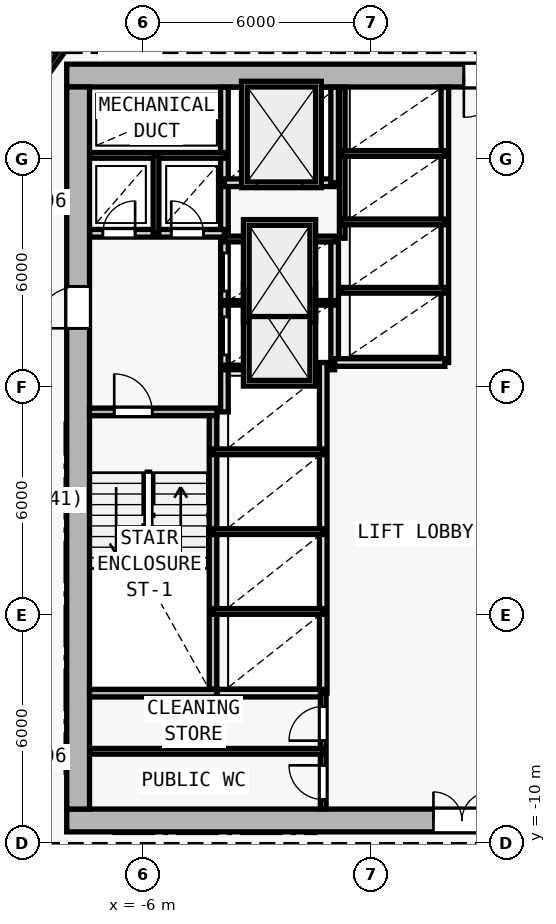
"""IFC4 building model, lengths in metres.
Left out: names, types, materials, properties, quantities, classifications, styles, units other than length and angle.
Written with IfcOpenShell. Run it as: python <this file> out.ifc"""

import sys

from ifc_helpers import new_model, si_unit, direction, frame, frame_2d, origin, origin_2d, place, context, subcontext, project, spatial, rectangle, i_section, extrude, element, fill, save


model = new_model("IFC4")
c1 = context("Model", 3, precision=1e-05, world=origin(), true_north=direction((0.0, 1.0)))
c2 = subcontext(c1, "Body", "Model", "MODEL_VIEW")
j1 = project(units=[si_unit("LENGTHUNIT", "METRE"), si_unit("PLANEANGLEUNIT", "RADIAN")], contexts=[c1])
p1 = place(None, origin())
s1 = spatial("IfcSite", under=j1, at=p1, CompositionType="ELEMENT")
p2 = place(p1, origin())
s2 = spatial("IfcBuilding", under=s1, at=p2, CompositionType="ELEMENT")
p3 = place(p2, frame((0.0, 0.0, 44.4)))
s3 = spatial("IfcBuildingStorey", under=s2, at=p3, CompositionType="ELEMENT", Elevation=44.4)
for number, where, z_axis, x_axis in (
    (1, (-7.7, -9.4, 0.0), (0.0, 0.0, 1.0), (1.0, 0.0, 0.0)),
    (2, (-7.7, 10.2, 0.0), (0.0, 0.0, 1.0), (1.0, 0.0, 0.0)),
    (3, (0.0, -9.4, 0.0), (0.0, 0.0, 1.0), (1.0, 0.0, 0.0)),
    (4, (-7.7, 2.0, 0.0), (0.0, 0.0, 1.0), (1.0, 0.0, 0.0)),
):
    element("IfcColumn", number, at=place(p3, frame(where, z_axis=z_axis, x_axis=x_axis)), inside=s3, PredefinedType="COLUMN", context=c2, shape_type="SweptSolid", body=[
        extrude(i_section(OverallWidth=0.416, OverallDepth=0.446, WebThickness=0.025, FlangeThickness=0.04, FilletRadius=0.015, at=origin_2d()), origin(), (0.0, 0.0, 1.0), 3.6),
    ])
p4 = place(p3, frame((-8.0, -9.4, 0.0), z_axis=(0.0, 0.0, 1.0), x_axis=(1.0, 0.0, 0.0)))
e5 = element("IfcWall", 5, at=p4, inside=s3, PredefinedType="SHEAR", context=c2, shape_type="SweptSolid", body=[
    extrude(rectangle(XDim=16.0, YDim=0.6, at=frame_2d((8.0, 0.0))), origin(), (0.0, 0.0, 1.0), 3.35),
])
p5 = place(p4, frame((9.65, 0.0, 0.0)))
e6 = element("IfcOpeningElement", 6, at=p5, cuts=e5, PredefinedType="OPENING", context=c2, shape_type="SweptSolid", body=[
    extrude(rectangle(XDim=1.5, YDim=2.2, at=frame_2d((0.75, 1.1))), frame((0.0, 0.31, 0.0), z_axis=(0.0, -1.0, 0.0), x_axis=(1.0, 0.0, 0.0)), (0.0, 0.0, 1.0), 0.62),
])
p6 = place(p3, frame((8.0, 10.2, 0.0), z_axis=(0.0, 0.0, 1.0), x_axis=(-1.0, 0.0, 0.0)))
e7 = element("IfcWall", 7, at=p6, inside=s3, PredefinedType="SHEAR", context=c2, shape_type="SweptSolid", body=[
    extrude(rectangle(XDim=16.0, YDim=0.6, at=frame_2d((8.0, 0.0))), origin(), (0.0, 0.0, 1.0), 3.35),
])
p7 = place(p6, frame((4.45, 0.0, 0.0)))
e8 = element("IfcOpeningElement", 8, at=p7, cuts=e7, PredefinedType="OPENING", context=c2, shape_type="SweptSolid", body=[
    extrude(rectangle(XDim=1.1, YDim=2.15, at=frame_2d((0.55, 1.075))), frame((0.0, 0.31, 0.0), z_axis=(0.0, -1.0, 0.0), x_axis=(1.0, 0.0, 0.0)), (0.0, 0.0, 1.0), 0.62),
])
p8 = place(p3, frame((-7.7, -9.1, 0.0), z_axis=(0.0, 0.0, 1.0), x_axis=(0.0, 1.0, 0.0)))
e9 = element("IfcWall", 9, at=p8, inside=s3, PredefinedType="SHEAR", context=c2, shape_type="SweptSolid", body=[
    extrude(rectangle(XDim=19.0, YDim=0.6, at=frame_2d((9.5, 0.0))), origin(), (0.0, 0.0, 1.0), 3.35),
])
p9 = place(p8, frame((12.65, 0.0, 0.0)))
e10 = element("IfcOpeningElement", 10, at=p9, cuts=e9, PredefinedType="OPENING", context=c2, shape_type="SweptSolid", body=[
    extrude(rectangle(XDim=1.1, YDim=2.15, at=frame_2d((0.55, 1.075))), frame((0.0, 0.31, 0.0), z_axis=(0.0, -1.0, 0.0), x_axis=(1.0, 0.0, 0.0)), (0.0, 0.0, 1.0), 0.62),
])
p10 = place(p3, frame((-7.4, 1.35, 0.0), z_axis=(0.0, 0.0, 1.0), x_axis=(1.0, 0.0, 0.0)))
e11 = element("IfcWall", 11, at=p10, inside=s3, PredefinedType="SOLIDWALL", context=c2, shape_type="SweptSolid", body=[
    extrude(rectangle(XDim=3.35, YDim=0.2, at=frame_2d((1.675, 0.0))), origin(), (0.0, 0.0, 1.0), 3.35),
])
p11 = place(p10, frame((0.65, 0.0, 0.0)))
e12 = element("IfcOpeningElement", 12, at=p11, cuts=e11, PredefinedType="OPENING", context=c2, shape_type="SweptSolid", body=[
    extrude(rectangle(XDim=1.0, YDim=2.15, at=frame_2d((0.5, 1.075))), frame((0.0, 0.11, 0.0), z_axis=(0.0, -1.0, 0.0), x_axis=(1.0, 0.0, 0.0)), (0.0, 0.0, 1.0), 0.22),
])
p12 = place(p3, frame((-4.15, -5.95, 0.0), z_axis=(0.0, 0.0, 1.0), x_axis=(0.0, 1.0, 0.0)))
e13 = element("IfcWall", 13, at=p12, inside=s3, PredefinedType="SOLIDWALL", context=c2, shape_type="SweptSolid", body=[
    extrude(rectangle(XDim=7.2, YDim=0.2, at=frame_2d((3.6, 0.0))), origin(), (0.0, 0.0, 1.0), 3.35),
])
p13 = place(p3, frame((-3.85, 1.35, 0.0), z_axis=(0.0, 0.0, 1.0), x_axis=(0.0, 1.0, 0.0)))
e14 = element("IfcWall", 14, at=p13, inside=s3, PredefinedType="SOLIDWALL", context=c2, shape_type="SweptSolid", body=[
    extrude(rectangle(XDim=8.545, YDim=0.2, at=frame_2d((4.272, 0.0))), origin(), (0.0, 0.0, 1.0), 3.35),
])
p14 = place(p13, frame((1.5, 0.0, 0.0)))
e15 = element("IfcOpeningElement", 15, at=p14, cuts=e14, PredefinedType="OPENING", context=c2, shape_type="SweptSolid", body=[
    extrude(rectangle(XDim=1.0, YDim=2.15, at=frame_2d((0.5, 1.075))), frame((0.0, 0.11, 0.0), z_axis=(0.0, -1.0, 0.0), x_axis=(1.0, 0.0, 0.0)), (0.0, 0.0, 1.0), 0.22),
])
p15 = place(p13, frame((3.18, 0.0, 0.0)))
e16 = element("IfcOpeningElement", 16, at=p15, cuts=e14, PredefinedType="OPENING", context=c2, shape_type="SweptSolid", body=[
    extrude(rectangle(XDim=1.0, YDim=2.15, at=frame_2d((0.5, 1.075))), frame((0.0, 0.11, 0.0), z_axis=(0.0, -1.0, 0.0), x_axis=(1.0, 0.0, 0.0)), (0.0, 0.0, 1.0), 0.22),
])
p16 = place(p3, frame((-7.395, 6.05, 0.0), z_axis=(0.0, 0.0, 1.0), x_axis=(1.0, 0.0, 0.0)))
e17 = element("IfcWall", 17, at=p16, inside=s3, PredefinedType="SOLIDWALL", context=c2, shape_type="SweptSolid", body=[
    extrude(rectangle(XDim=3.545, YDim=0.2, at=frame_2d((1.772, 0.0))), origin(), (0.0, 0.0, 1.0), 3.35),
])
p17 = place(p16, frame((0.345, 0.0, 0.0)))
e18 = element("IfcOpeningElement", 18, at=p17, cuts=e17, PredefinedType="OPENING", context=c2, shape_type="SweptSolid", body=[
    extrude(rectangle(XDim=0.85, YDim=2.1, at=frame_2d((0.425, 1.05))), frame((0.0, 0.11, 0.0), z_axis=(0.0, -1.0, 0.0), x_axis=(1.0, 0.0, 0.0)), (0.0, 0.0, 1.0), 0.22),
])
p18 = place(p16, frame((2.145, 0.0, 0.0)))
e19 = element("IfcOpeningElement", 19, at=p18, cuts=e17, PredefinedType="OPENING", context=c2, shape_type="SweptSolid", body=[
    extrude(rectangle(XDim=0.85, YDim=2.1, at=frame_2d((0.425, 1.05))), frame((0.0, 0.11, 0.0), z_axis=(0.0, -1.0, 0.0), x_axis=(1.0, 0.0, 0.0)), (0.0, 0.0, 1.0), 0.22),
])
p19 = place(p3, frame((-7.395, 8.1, 0.0), z_axis=(0.0, 0.0, 1.0), x_axis=(1.0, 0.0, 0.0)))
e20 = element("IfcWall", 20, at=p19, inside=s3, PredefinedType="PARTITIONING", context=c2, shape_type="SweptSolid", body=[
    extrude(rectangle(XDim=3.545, YDim=0.15, at=frame_2d((1.772, 0.0))), origin(), (0.0, 0.0, 1.0), 3.35),
])
p20 = place(p3, frame((-5.65, 6.05, 0.0), z_axis=(0.0, 0.0, 1.0), x_axis=(0.0, 1.0, 0.0)))
e21 = element("IfcWall", 21, at=p20, inside=s3, PredefinedType="PARTITIONING", context=c2, shape_type="SweptSolid", body=[
    extrude(rectangle(XDim=2.05, YDim=0.15, at=frame_2d((1.025, 0.0))), origin(), (0.0, 0.0, 1.0), 3.35),
])
p21 = place(p3, frame((-0.95, 2.65, 0.0), z_axis=(0.0, 0.0, 1.0), x_axis=(0.0, 1.0, 0.0)))
e22 = element("IfcWall", 22, at=p21, inside=s3, PredefinedType="SOLIDWALL", context=c2, shape_type="SweptSolid", body=[
    extrude(rectangle(XDim=3.27, YDim=0.2, at=frame_2d((1.635, 0.0))), origin(), (0.0, 0.0, 1.0), 3.35),
])
for number, where, z_axis, x_axis in (
    (23, (-3.85, 2.52, 0.0), (0.0, 0.0, 1.0), (1.0, 0.0, 0.0)),
    (24, (-3.85, 4.22, 0.0), (0.0, 0.0, 1.0), (1.0, 0.0, 0.0)),
):
    element("IfcWall", number, at=place(p3, frame(where, z_axis=z_axis, x_axis=x_axis)), inside=s3, PredefinedType="PARTITIONING", context=c2, shape_type="SweptSolid", body=[
        extrude(rectangle(XDim=2.9, YDim=0.12, at=frame_2d((1.45, 0.0))), origin(), (0.0, 0.0, 1.0), 3.35),
    ])
p22 = place(p3, frame((-3.85, 5.9, 0.0), z_axis=(0.0, 0.0, 1.0), x_axis=(1.0, 0.0, 0.0)))
e25 = element("IfcWall", 25, at=p22, inside=s3, PredefinedType="PARTITIONING", context=c2, shape_type="SweptSolid", body=[
    extrude(rectangle(XDim=2.9, YDim=0.15, at=frame_2d((1.45, 0.0))), origin(), (0.0, 0.0, 1.0), 3.35),
])
p23 = place(p3, frame((-3.85, 7.38, 0.0), z_axis=(0.0, 0.0, 1.0), x_axis=(1.0, 0.0, 0.0)))
e26 = element("IfcWall", 26, at=p23, inside=s3, PredefinedType="SOLIDWALL", context=c2, shape_type="SweptSolid", body=[
    extrude(rectangle(XDim=2.9, YDim=0.2, at=frame_2d((1.45, 0.0))), origin(), (0.0, 0.0, 1.0), 3.35),
])
p24 = place(p23, frame((0.85, 0.0, 0.0)))
e27 = element("IfcOpeningElement", 27, at=p24, cuts=e26, PredefinedType="OPENING", context=c2, shape_type="SweptSolid", body=[
    extrude(rectangle(XDim=1.2, YDim=2.2, at=frame_2d((0.6, 1.1))), frame((0.0, 0.11, 0.0), z_axis=(0.0, -1.0, 0.0), x_axis=(1.0, 0.0, 0.0)), (0.0, 0.0, 1.0), 0.22),
])
p25 = place(p3, frame((-0.95, 7.38, 0.0), z_axis=(0.0, 0.0, 1.0), x_axis=(0.0, 1.0, 0.0)))
e28 = element("IfcWall", 28, at=p25, inside=s3, PredefinedType="SOLIDWALL", context=c2, shape_type="SweptSolid", body=[
    extrude(rectangle(XDim=2.515, YDim=0.2, at=frame_2d((1.258, 0.0))), origin(), (0.0, 0.0, 1.0), 3.35),
])
p26 = place(p3, frame((-1.25, -6.05, 0.0), z_axis=(0.0, 0.0, 1.0), x_axis=(0.0, 1.0, 0.0)))
e29 = element("IfcWall", 29, at=p26, inside=s3, PredefinedType="SOLIDWALL", context=c2, shape_type="SweptSolid", body=[
    extrude(rectangle(XDim=8.7, YDim=0.2, at=frame_2d((4.35, 0.0))), origin(), (0.0, 0.0, 1.0), 3.35),
])
for number, where, z_axis, x_axis in (
    (30, (-4.15, -3.9, 0.0), (0.0, 0.0, 1.0), (1.0, 0.0, 0.0)),
    (31, (-4.15, -1.8, 0.0), (0.0, 0.0, 1.0), (1.0, 0.0, 0.0)),
    (32, (-4.15, 0.3, 0.0), (0.0, 0.0, 1.0), (1.0, 0.0, 0.0)),
):
    element("IfcWall", number, at=place(p3, frame(where, z_axis=z_axis, x_axis=x_axis)), inside=s3, PredefinedType="PARTITIONING", context=c2, shape_type="SweptSolid", body=[
        extrude(rectangle(XDim=2.9, YDim=0.15, at=frame_2d((1.45, 0.0))), origin(), (0.0, 0.0, 1.0), 3.35),
    ])
p27 = place(p3, frame((1.95, 2.65, 0.0), z_axis=(0.0, 0.0, 1.0), x_axis=(0.0, 1.0, 0.0)))
e33 = element("IfcWall", 33, at=p27, inside=s3, PredefinedType="SOLIDWALL", context=c2, shape_type="SweptSolid", body=[
    extrude(rectangle(XDim=7.245, YDim=0.2, at=frame_2d((3.623, 0.0))), origin(), (0.0, 0.0, 1.0), 3.35),
])
p28 = place(p3, frame((-0.95, 2.65, 0.0), z_axis=(0.0, 0.0, 1.0), x_axis=(1.0, 0.0, 0.0)))
e34 = element("IfcWall", 34, at=p28, inside=s3, PredefinedType="SOLIDWALL", context=c2, shape_type="SweptSolid", body=[
    extrude(rectangle(XDim=2.9, YDim=0.2, at=frame_2d((1.45, 0.0))), origin(), (0.0, 0.0, 1.0), 3.35),
])
p29 = place(p3, frame((-0.75, 5.92, 0.0), z_axis=(0.0, 0.0, 1.0), x_axis=(0.0, 1.0, 0.0)))
e35 = element("IfcWall", 35, at=p29, inside=s3, PredefinedType="PARTITIONING", context=c2, shape_type="SweptSolid", body=[
    extrude(rectangle(XDim=3.975, YDim=0.15, at=frame_2d((1.988, 0.0))), origin(), (0.0, 0.0, 1.0), 3.35),
])
for number, where, z_axis, x_axis in (
    (36, (-0.75, 4.55, 0.0), (0.0, 0.0, 1.0), (1.0, 0.0, 0.0)),
    (37, (-0.75, 6.35, 0.0), (0.0, 0.0, 1.0), (1.0, 0.0, 0.0)),
    (38, (-0.75, 8.15, 0.0), (0.0, 0.0, 1.0), (1.0, 0.0, 0.0)),
):
    element("IfcWall", number, at=place(p3, frame(where, z_axis=z_axis, x_axis=x_axis)), inside=s3, PredefinedType="PARTITIONING", context=c2, shape_type="SweptSolid", body=[
        extrude(rectangle(XDim=2.7, YDim=0.15, at=frame_2d((1.35, 0.0))), origin(), (0.0, 0.0, 1.0), 3.35),
    ])
p30 = place(p3, frame((-7.4, -6.05, 0.0), z_axis=(0.0, 0.0, 1.0), x_axis=(1.0, 0.0, 0.0)))
e39 = element("IfcWall", 39, at=p30, inside=s3, PredefinedType="SOLIDWALL", context=c2, shape_type="SweptSolid", body=[
    extrude(rectangle(XDim=3.35, YDim=0.2, at=frame_2d((1.675, 0.0))), origin(), (0.0, 0.0, 1.0), 3.35),
])
p31 = place(p3, frame((-4.04, -6.05, 0.0), z_axis=(0.0, 0.0, 1.0), x_axis=(1.0, 0.0, 0.0)))
e40 = element("IfcWall", 40, at=p31, inside=s3, PredefinedType="SOLIDWALL", context=c2, shape_type="SweptSolid", body=[
    extrude(rectangle(XDim=2.79, YDim=0.2, at=frame_2d((1.395, 0.0))), origin(), (0.0, 0.0, 1.0), 3.35),
])
p32 = place(p3, frame((-1.25, -9.095, 0.0), z_axis=(0.0, 0.0, 1.0), x_axis=(0.0, 1.0, 0.0)))
e41 = element("IfcWall", 41, at=p32, inside=s3, PredefinedType="PARTITIONING", context=c2, shape_type="SweptSolid", body=[
    extrude(rectangle(XDim=3.045, YDim=0.15, at=frame_2d((1.522, 0.0))), origin(), (0.0, 0.0, 1.0), 3.35),
])
p33 = place(p32, frame((1.795, 0.0, 0.0)))
e42 = element("IfcOpeningElement", 42, at=p33, cuts=e41, PredefinedType="OPENING", context=c2, shape_type="SweptSolid", body=[
    extrude(rectangle(XDim=0.9, YDim=2.1, at=frame_2d((0.45, 1.05))), frame((0.0, 0.085, 0.0), z_axis=(0.0, -1.0, 0.0), x_axis=(1.0, 0.0, 0.0)), (0.0, 0.0, 1.0), 0.17),
])
p34 = place(p32, frame((0.245, 0.0, 0.0)))
e43 = element("IfcOpeningElement", 43, at=p34, cuts=e41, PredefinedType="OPENING", context=c2, shape_type="SweptSolid", body=[
    extrude(rectangle(XDim=0.9, YDim=2.1, at=frame_2d((0.45, 1.05))), frame((0.0, 0.085, 0.0), z_axis=(0.0, -1.0, 0.0), x_axis=(1.0, 0.0, 0.0)), (0.0, 0.0, 1.0), 0.17),
])
p35 = place(p3, frame((-7.395, -7.58, 0.0), z_axis=(0.0, 0.0, 1.0), x_axis=(1.0, 0.0, 0.0)))
e44 = element("IfcWall", 44, at=p35, inside=s3, PredefinedType="PARTITIONING", context=c2, shape_type="SweptSolid", body=[
    extrude(rectangle(XDim=6.145, YDim=0.15, at=frame_2d((3.073, 0.0))), origin(), (0.0, 0.0, 1.0), 3.35),
])
p36 = place(p3, frame((-9.86, 8.426, 0.0), z_axis=(0.0, 0.0, 1.0), x_axis=(0.582449511476, 0.812866881218, 0.0)))
e45 = element("IfcWall", 45, at=p36, inside=s3, PredefinedType="PARTITIONING", context=c2, shape_type="SweptSolid", body=[
    extrude(rectangle(XDim=4.84, YDim=0.15, at=frame_2d((2.42, 0.0))), origin(), (0.0, 0.0, 1.0), 2.725),
])
p37 = place(p36, frame((3.038, 0.0, 0.0)))
e46 = element("IfcOpeningElement", 46, at=p37, cuts=e45, PredefinedType="OPENING", context=c2, shape_type="SweptSolid", body=[
    extrude(rectangle(XDim=0.9, YDim=2.1, at=frame_2d((0.45, 1.05))), frame((0.0, 0.085, 0.0), z_axis=(0.0, -1.0, 0.0), x_axis=(1.0, 0.0, 0.0)), (0.0, 0.0, 1.0), 0.17),
])
p38 = place(p5, origin())
e47 = element("IfcDoor", 47, at=p38, inside=s3, OperationType="DOUBLE_DOOR_SINGLE_SWING", PredefinedType="DOOR", context=c2, shape_type="SweptSolid", body=[
    extrude(rectangle(XDim=1.5, YDim=2.2, at=frame_2d((0.75, 1.1))), frame((0.0, 0.025, 0.0), z_axis=(0.0, -1.0, 0.0), x_axis=(1.0, 0.0, 0.0)), (0.0, 0.0, 1.0), 0.05),
])
fill(e6, e47)
p39 = place(p9, origin())
e48 = element("IfcDoor", 48, at=p39, inside=s3, OperationType="SINGLE_SWING_LEFT", PredefinedType="DOOR", context=c2, shape_type="SweptSolid", body=[
    extrude(rectangle(XDim=1.1, YDim=2.15, at=frame_2d((0.55, 1.075))), frame((0.0, 0.025, 0.0), z_axis=(0.0, -1.0, 0.0), x_axis=(1.0, 0.0, 0.0)), (0.0, 0.0, 1.0), 0.05),
])
fill(e10, e48)
p40 = place(p7, origin())
e49 = element("IfcDoor", 49, at=p40, inside=s3, OperationType="SINGLE_SWING_RIGHT", PredefinedType="DOOR", context=c2, shape_type="SweptSolid", body=[
    extrude(rectangle(XDim=1.1, YDim=2.15, at=frame_2d((0.55, 1.075))), frame((0.0, 0.025, 0.0), z_axis=(0.0, -1.0, 0.0), x_axis=(1.0, 0.0, 0.0)), (0.0, 0.0, 1.0), 0.05),
])
fill(e8, e49)
p41 = place(p11, origin())
e50 = element("IfcDoor", 50, at=p41, inside=s3, OperationType="SINGLE_SWING_LEFT", PredefinedType="DOOR", context=c2, shape_type="SweptSolid", body=[
    extrude(rectangle(XDim=1.0, YDim=2.15, at=frame_2d((0.5, 1.075))), frame((0.0, 0.025, 0.0), z_axis=(0.0, -1.0, 0.0), x_axis=(1.0, 0.0, 0.0)), (0.0, 0.0, 1.0), 0.05),
])
fill(e12, e50)
p42 = place(p17, origin())
e51 = element("IfcDoor", 51, at=p42, inside=s3, OperationType="SINGLE_SWING_RIGHT", PredefinedType="DOOR", context=c2, shape_type="SweptSolid", body=[
    extrude(rectangle(XDim=0.85, YDim=2.1, at=frame_2d((0.425, 1.05))), frame((0.0, 0.025, 0.0), z_axis=(0.0, -1.0, 0.0), x_axis=(1.0, 0.0, 0.0)), (0.0, 0.0, 1.0), 0.05),
])
fill(e18, e51)
p43 = place(p18, origin())
e52 = element("IfcDoor", 52, at=p43, inside=s3, OperationType="SINGLE_SWING_LEFT", PredefinedType="DOOR", context=c2, shape_type="SweptSolid", body=[
    extrude(rectangle(XDim=0.85, YDim=2.1, at=frame_2d((0.425, 1.05))), frame((0.0, 0.025, 0.0), z_axis=(0.0, -1.0, 0.0), x_axis=(1.0, 0.0, 0.0)), (0.0, 0.0, 1.0), 0.05),
])
fill(e19, e52)
p44 = place(p24, origin())
e53 = element("IfcDoor", 53, at=p44, inside=s3, OperationType="DOUBLE_DOOR_SLIDING", PredefinedType="DOOR", context=c2, shape_type="SweptSolid", body=[
    extrude(rectangle(XDim=1.2, YDim=2.2, at=frame_2d((0.6, 1.1))), frame((0.0, 0.025, 0.0), z_axis=(0.0, -1.0, 0.0), x_axis=(1.0, 0.0, 0.0)), (0.0, 0.0, 1.0), 0.05),
])
fill(e27, e53)
p45 = place(p14, origin())
e54 = element("IfcDoor", 54, at=p45, inside=s3, OperationType="DOUBLE_DOOR_SLIDING", PredefinedType="DOOR", context=c2, shape_type="SweptSolid", body=[
    extrude(rectangle(XDim=1.0, YDim=2.15, at=frame_2d((0.5, 1.075))), frame((0.0, 0.025, 0.0), z_axis=(0.0, -1.0, 0.0), x_axis=(1.0, 0.0, 0.0)), (0.0, 0.0, 1.0), 0.05),
])
fill(e15, e54)
p46 = place(p15, origin())
e55 = element("IfcDoor", 55, at=p46, inside=s3, OperationType="DOUBLE_DOOR_SLIDING", PredefinedType="DOOR", context=c2, shape_type="SweptSolid", body=[
    extrude(rectangle(XDim=1.0, YDim=2.15, at=frame_2d((0.5, 1.075))), frame((0.0, 0.025, 0.0), z_axis=(0.0, -1.0, 0.0), x_axis=(1.0, 0.0, 0.0)), (0.0, 0.0, 1.0), 0.05),
])
fill(e16, e55)
p47 = place(p33, origin())
e56 = element("IfcDoor", 56, at=p47, inside=s3, OperationType="SINGLE_SWING_LEFT", PredefinedType="DOOR", context=c2, shape_type="SweptSolid", body=[
    extrude(rectangle(XDim=0.9, YDim=2.1, at=frame_2d((0.45, 1.05))), frame((0.0, 0.025, 0.0), z_axis=(0.0, -1.0, 0.0), x_axis=(1.0, 0.0, 0.0)), (0.0, 0.0, 1.0), 0.05),
])
fill(e42, e56)
p48 = place(p34, origin())
e57 = element("IfcDoor", 57, at=p48, inside=s3, OperationType="SINGLE_SWING_RIGHT", PredefinedType="DOOR", context=c2, shape_type="SweptSolid", body=[
    extrude(rectangle(XDim=0.9, YDim=2.1, at=frame_2d((0.45, 1.05))), frame((0.0, 0.025, 0.0), z_axis=(0.0, -1.0, 0.0), x_axis=(1.0, 0.0, 0.0)), (0.0, 0.0, 1.0), 0.05),
])
fill(e43, e57)
save(model, sys.argv[1])
